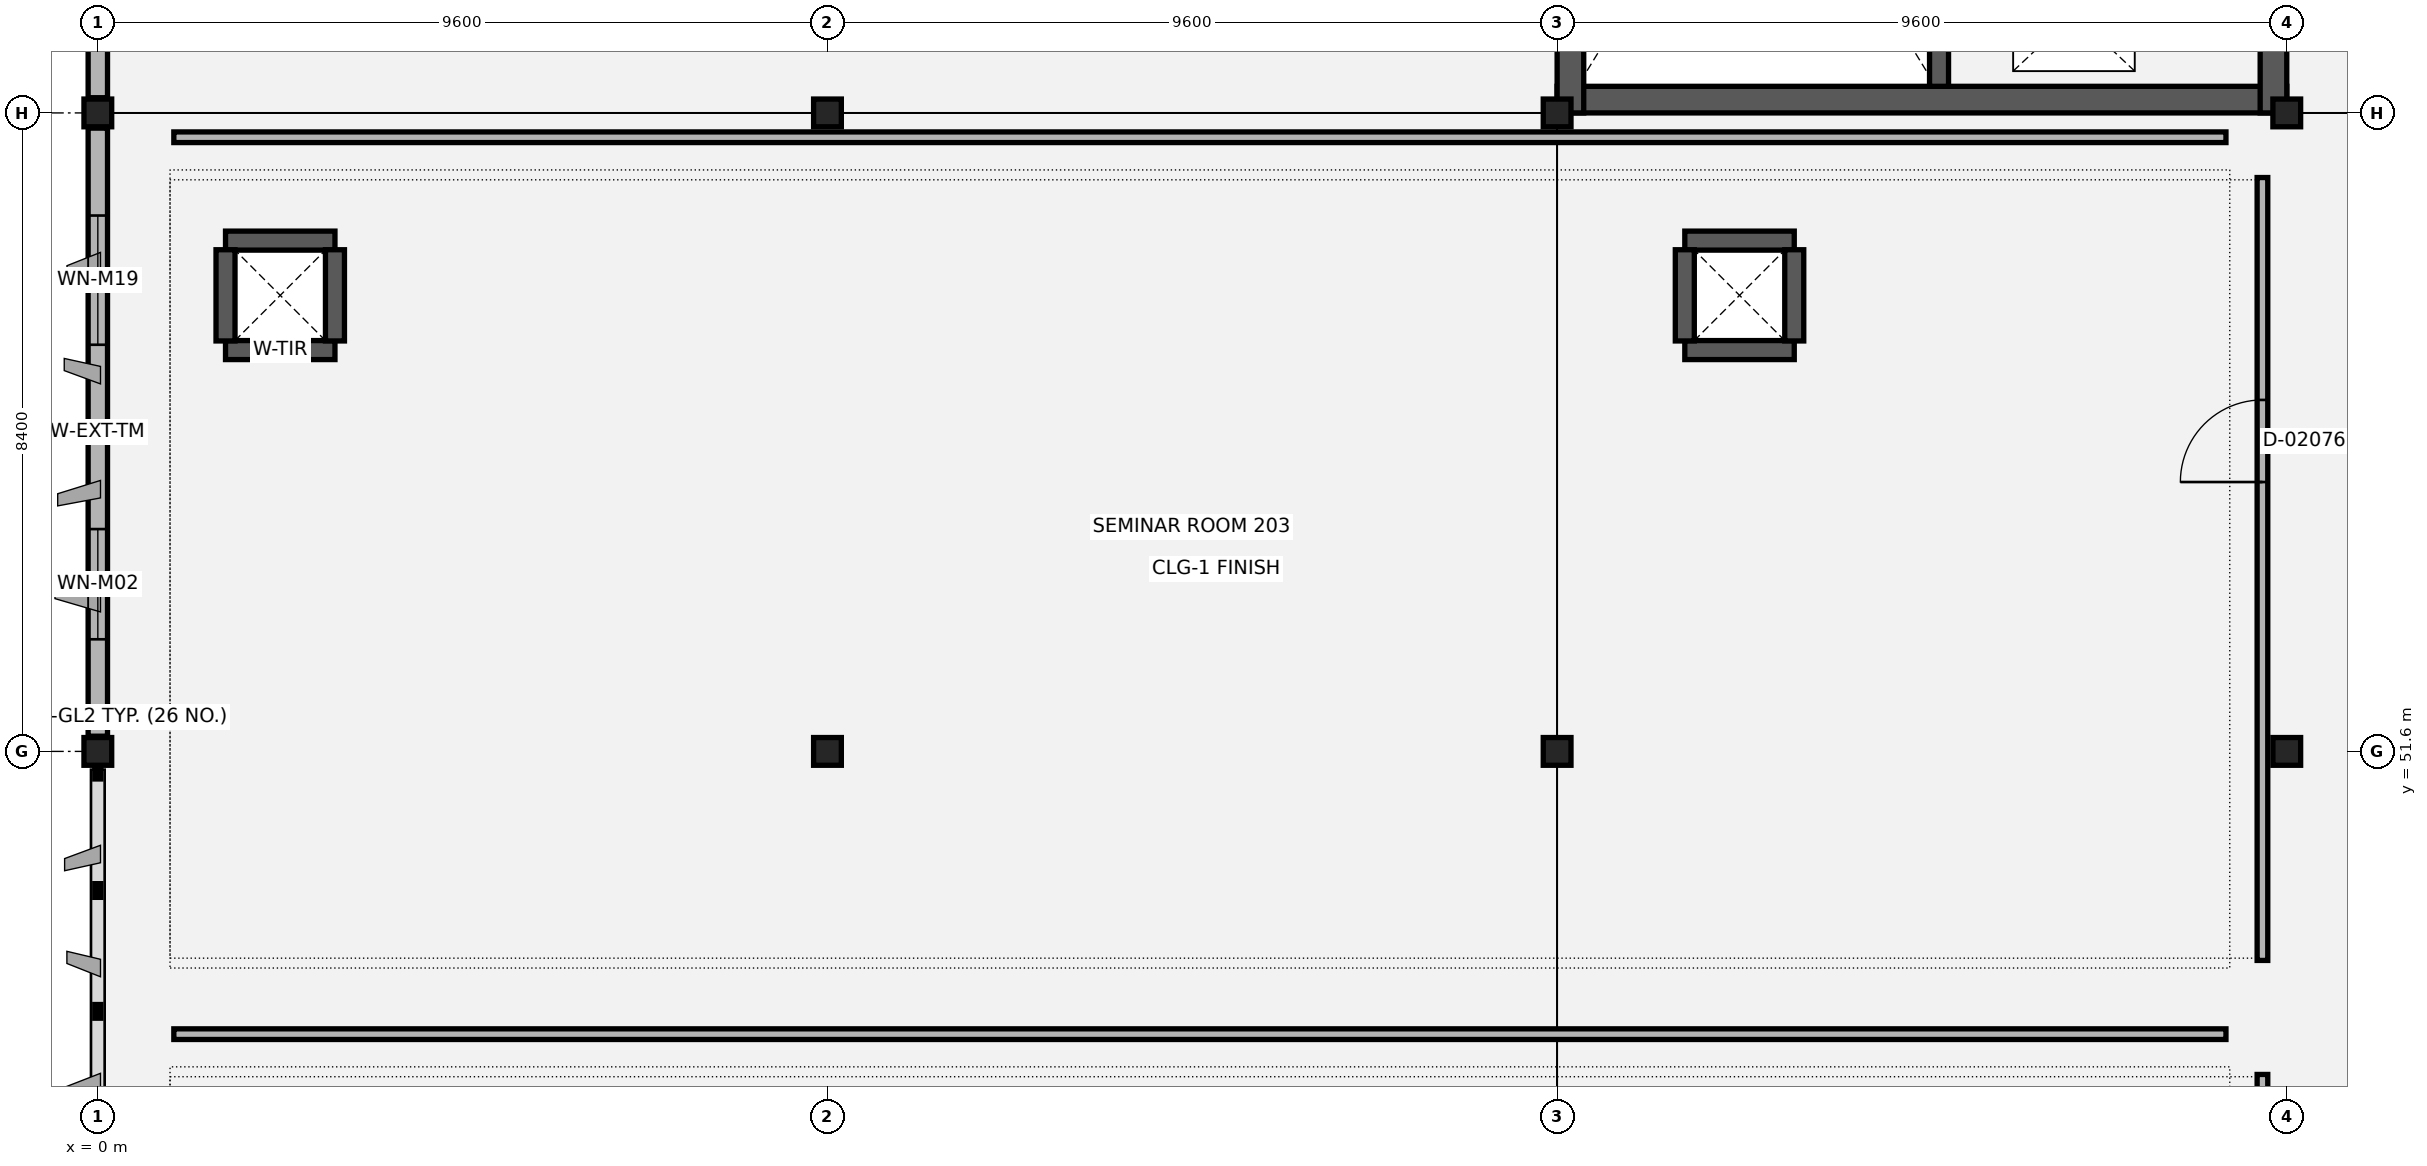
"""IFC4 building model, lengths in metres.
Left out: names, types, materials, properties, quantities, classifications, styles, units other than length and angle.
Written with IfcOpenShell. Run it as: python <this file> out.ifc"""

import sys

from ifc_helpers import new_model, si_unit, direction, frame, frame_2d, origin, origin_2d, place, context, subcontext, project, spatial, rectangle, extrude, element, fill, save


model = new_model("IFC4")
c1 = context("Model", 3, precision=1e-05, world=origin(), true_north=direction((0.0, 1.0)))
c2 = subcontext(c1, "Body", "Model", "MODEL_VIEW")
j1 = project(units=[si_unit("LENGTHUNIT", "METRE"), si_unit("PLANEANGLEUNIT", "RADIAN")], contexts=[c1])
p1 = place(None, origin())
s1 = spatial("IfcSite", under=j1, at=p1, CompositionType="ELEMENT")
p2 = place(p1, origin())
s2 = spatial("IfcBuilding", under=s1, at=p2, CompositionType="ELEMENT")
p3 = place(p2, frame((0.0, 0.0, 10.2)))
s3 = spatial("IfcBuildingStorey", under=s2, at=p3, CompositionType="ELEMENT", Elevation=10.2)
for number, where, z_axis, x_axis in (
    (1, (0.0, 51.6, 0.0), (0.0, 0.0, 1.0), (1.0, 0.0, 0.0)),
    (2, (0.0, 60.0, 0.0), (0.0, 0.0, 1.0), (1.0, 0.0, 0.0)),
    (3, (9.6, 51.6, 0.0), (0.0, 0.0, 1.0), (1.0, 0.0, 0.0)),
    (4, (9.6, 60.0, 0.0), (0.0, 0.0, 1.0), (1.0, 0.0, 0.0)),
    (5, (19.2, 51.6, 0.0), (0.0, 0.0, 1.0), (1.0, 0.0, 0.0)),
    (6, (19.2, 60.0, 0.0), (0.0, 0.0, 1.0), (1.0, 0.0, 0.0)),
    (7, (28.8, 51.6, 0.0), (0.0, 0.0, 1.0), (1.0, 0.0, 0.0)),
    (8, (28.8, 60.0, 0.0), (0.0, 0.0, 1.0), (1.0, 0.0, 0.0)),
):
    element("IfcColumn", number, at=place(p3, frame(where, z_axis=z_axis, x_axis=x_axis)), inside=s3, PredefinedType="COLUMN", context=c2, shape_type="SweptSolid", body=[
        extrude(rectangle(XDim=0.365, YDim=0.365, at=origin_2d()), origin(), (0.0, 0.0, 1.0), 4.2),
    ])
for number, where, z_axis, x_axis in (
    (9, (1.68, 56.88, 0.0), (0.0, 0.0, 1.0), (1.0, 0.0, 0.0)),
    (10, (1.68, 58.32, 0.0), (0.0, 0.0, 1.0), (1.0, 0.0, 0.0)),
):
    element("IfcWall", number, at=place(p3, frame(where, z_axis=z_axis, x_axis=x_axis)), inside=s3, PredefinedType="SHEAR", context=c2, shape_type="SweptSolid", body=[
        extrude(rectangle(XDim=1.44, YDim=0.25, at=frame_2d((0.72, 0.0))), origin(), (0.0, 0.0, 1.0), 3.1),
    ])
for number, where, z_axis, x_axis in (
    (11, (1.68, 57.0, 0.0), (0.0, 0.0, 1.0), (0.0, 1.0, 0.0)),
    (12, (3.12, 57.0, 0.0), (0.0, 0.0, 1.0), (0.0, 1.0, 0.0)),
):
    element("IfcWall", number, at=place(p3, frame(where, z_axis=z_axis, x_axis=x_axis)), inside=s3, PredefinedType="SHEAR", context=c2, shape_type="SweptSolid", body=[
        extrude(rectangle(XDim=1.2, YDim=0.25, at=frame_2d((0.6, 0.0))), origin(), (0.0, 0.0, 1.0), 3.1),
    ])
for number, where, z_axis, x_axis in (
    (13, (20.88, 56.88, 0.0), (0.0, 0.0, 1.0), (1.0, 0.0, 0.0)),
    (14, (20.88, 58.32, 0.0), (0.0, 0.0, 1.0), (1.0, 0.0, 0.0)),
):
    element("IfcWall", number, at=place(p3, frame(where, z_axis=z_axis, x_axis=x_axis)), inside=s3, PredefinedType="SHEAR", context=c2, shape_type="SweptSolid", body=[
        extrude(rectangle(XDim=1.44, YDim=0.25, at=frame_2d((0.72, 0.0))), origin(), (0.0, 0.0, 1.0), 3.1),
    ])
for number, where, z_axis, x_axis in (
    (15, (20.88, 57.0, 0.0), (0.0, 0.0, 1.0), (0.0, 1.0, 0.0)),
    (16, (22.32, 57.0, 0.0), (0.0, 0.0, 1.0), (0.0, 1.0, 0.0)),
):
    element("IfcWall", number, at=place(p3, frame(where, z_axis=z_axis, x_axis=x_axis)), inside=s3, PredefinedType="SHEAR", context=c2, shape_type="SweptSolid", body=[
        extrude(rectangle(XDim=1.2, YDim=0.25, at=frame_2d((0.6, 0.0))), origin(), (0.0, 0.0, 1.0), 3.1),
    ])
p4 = place(p3, frame((0.0, 59.8, 0.0), z_axis=(0.0, 0.0, 1.0), x_axis=(0.0, -1.0, 0.0)))
e17 = element("IfcWall", 17, at=p4, inside=s3, PredefinedType="SOLIDWALL", context=c2, shape_type="SweptSolid", body=[
    extrude(rectangle(XDim=8.0, YDim=0.255, at=frame_2d((4.0, 0.0))), origin(), (0.0, 0.0, 1.0), 3.05),
])
p5 = place(p4, frame((1.15, 0.0, 0.9)))
e18 = element("IfcOpeningElement", 18, at=p5, cuts=e17, PredefinedType="OPENING", context=c2, shape_type="SweptSolid", body=[
    extrude(rectangle(XDim=1.7, YDim=1.45, at=frame_2d((0.85, 0.725))), frame((0.0, 0.137, 0.0), z_axis=(0.0, -1.0, 0.0), x_axis=(1.0, 0.0, 0.0)), (0.0, 0.0, 1.0), 0.275),
])
p6 = place(p4, frame((5.275, 0.0, 0.9)))
e19 = element("IfcOpeningElement", 19, at=p6, cuts=e17, PredefinedType="OPENING", context=c2, shape_type="SweptSolid", body=[
    extrude(rectangle(XDim=1.45, YDim=1.45, at=frame_2d((0.725, 0.725))), frame((0.0, 0.137, 0.0), z_axis=(0.0, -1.0, 0.0), x_axis=(1.0, 0.0, 0.0)), (0.0, 0.0, 1.0), 0.275),
])
p7 = place(p3, frame((0.0, 68.2, 0.0), z_axis=(0.0, 0.0, 1.0), x_axis=(0.0, -1.0, 0.0)))
e20 = element("IfcWall", 20, at=p7, inside=s3, PredefinedType="SOLIDWALL", context=c2, shape_type="SweptSolid", body=[
    extrude(rectangle(XDim=8.0, YDim=0.255, at=frame_2d((4.0, 0.0))), origin(), (0.0, 0.0, 1.0), 3.05),
])
p8 = place(p7, frame((0.75, 0.0, 0.9)))
e21 = element("IfcOpeningElement", 21, at=p8, cuts=e20, PredefinedType="OPENING", context=c2, shape_type="SweptSolid", body=[
    extrude(rectangle(XDim=2.5, YDim=1.65, at=frame_2d((1.25, 0.825))), frame((0.0, 0.137, 0.0), z_axis=(0.0, -1.0, 0.0), x_axis=(1.0, 0.0, 0.0)), (0.0, 0.0, 1.0), 0.275),
])
p9 = place(p7, frame((5.125, 0.0, 0.9)))
e22 = element("IfcOpeningElement", 22, at=p9, cuts=e20, PredefinedType="OPENING", context=c2, shape_type="SweptSolid", body=[
    extrude(rectangle(XDim=1.75, YDim=1.55, at=frame_2d((0.875, 0.775))), frame((0.0, 0.137, 0.0), z_axis=(0.0, -1.0, 0.0), x_axis=(1.0, 0.0, 0.0)), (0.0, 0.0, 1.0), 0.275),
])
p10 = place(p3, frame((19.2, 60.175, 0.0), z_axis=(0.0, 0.0, 1.0), x_axis=(1.0, 0.0, 0.0)))
e23 = element("IfcWall", 23, at=p10, inside=s3, PredefinedType="SHEAR", context=c2, shape_type="SweptSolid", body=[
    extrude(rectangle(XDim=9.6, YDim=0.35, at=frame_2d((4.8, 0.0))), origin(), (0.0, 0.0, 1.0), 3.95),
])
p11 = place(p3, frame((19.375, 60.0, 0.0), z_axis=(0.0, 0.0, 1.0), x_axis=(0.0, 1.0, 0.0)))
e24 = element("IfcWall", 24, at=p11, inside=s3, PredefinedType="SHEAR", context=c2, shape_type="SweptSolid", body=[
    extrude(rectangle(XDim=8.4, YDim=0.35, at=frame_2d((4.2, 0.0))), origin(), (0.0, 0.0, 1.0), 3.95),
])
p12 = place(p3, frame((28.625, 60.0, 0.0), z_axis=(0.0, 0.0, 1.0), x_axis=(0.0, 1.0, 0.0)))
e25 = element("IfcWall", 25, at=p12, inside=s3, PredefinedType="SHEAR", context=c2, shape_type="SweptSolid", body=[
    extrude(rectangle(XDim=8.4, YDim=0.35, at=frame_2d((4.2, 0.0))), origin(), (0.0, 0.0, 1.0), 3.95),
])
p13 = place(p12, frame((5.3, 0.0, 0.0)))
e26 = element("IfcOpeningElement", 26, at=p13, cuts=e25, PredefinedType="OPENING", context=c2, shape_type="SweptSolid", body=[
    extrude(rectangle(XDim=1.4, YDim=2.15, at=frame_2d((0.7, 1.075))), frame((0.0, 0.185, 0.0), z_axis=(0.0, -1.0, 0.0), x_axis=(1.0, 0.0, 0.0)), (0.0, 0.0, 1.0), 0.37),
])
p14 = place(p3, frame((24.225, 68.05, 0.0), z_axis=(0.0, 0.0, 1.0), x_axis=(0.0, -1.0, 0.0)))
e27 = element("IfcWall", 27, at=p14, inside=s3, PredefinedType="SHEAR", context=c2, shape_type="SweptSolid", body=[
    extrude(rectangle(XDim=7.7, YDim=0.25, at=frame_2d((3.85, 0.0))), origin(), (0.0, 0.0, 1.0), 3.95),
])
p15 = place(p14, frame((0.45, 0.0, 0.0)))
e28 = element("IfcOpeningElement", 28, at=p15, cuts=e27, PredefinedType="OPENING", context=c2, shape_type="SweptSolid", body=[
    extrude(rectangle(XDim=1.25, YDim=2.15, at=frame_2d((0.625, 1.075))), frame((0.0, 0.135, 0.0), z_axis=(0.0, -1.0, 0.0), x_axis=(1.0, 0.0, 0.0)), (0.0, 0.0, 1.0), 0.27),
])
p16 = place(p3, frame((28.48, 33.25, 0.0), z_axis=(0.0, 0.0, 1.0), x_axis=(0.0, 1.0, 0.0)))
e29 = element("IfcWall", 29, at=p16, inside=s3, PredefinedType="PARTITIONING", context=c2, shape_type="SweptSolid", body=[
    extrude(rectangle(XDim=14.1, YDim=0.14, at=frame_2d((7.05, 0.0))), origin(), (0.0, 0.0, 1.0), 3.03),
])
p17 = place(p16, frame((2.239, 0.0, 0.0)))
e30 = element("IfcOpeningElement", 30, at=p17, cuts=e29, PredefinedType="OPENING", context=c2, shape_type="SweptSolid", body=[
    extrude(rectangle(XDim=1.04, YDim=2.15, at=frame_2d((0.52, 1.075))), frame((0.0, 0.08, 0.0), z_axis=(0.0, -1.0, 0.0), x_axis=(1.0, 0.0, 0.0)), (0.0, 0.0, 1.0), 0.16),
])
p18 = place(p3, frame((1.0, 47.88, 0.0), z_axis=(0.0, 0.0, 1.0), x_axis=(1.0, 0.0, 0.0)))
e31 = element("IfcWall", 31, at=p18, inside=s3, PredefinedType="PARTITIONING", context=c2, shape_type="SweptSolid", body=[
    extrude(rectangle(XDim=27.0, YDim=0.14, at=frame_2d((13.5, 0.0))), origin(), (0.0, 0.0, 1.0), 3.03),
])
p19 = place(p3, frame((28.48, 48.85, 0.0), z_axis=(0.0, 0.0, 1.0), x_axis=(0.0, 1.0, 0.0)))
e32 = element("IfcWall", 32, at=p19, inside=s3, PredefinedType="PARTITIONING", context=c2, shape_type="SweptSolid", body=[
    extrude(rectangle(XDim=10.3, YDim=0.14, at=frame_2d((5.15, 0.0))), origin(), (0.0, 0.0, 1.0), 3.03),
])
p20 = place(p19, frame((6.294, 0.0, 0.0)))
e33 = element("IfcOpeningElement", 33, at=p20, cuts=e32, PredefinedType="OPENING", context=c2, shape_type="SweptSolid", body=[
    extrude(rectangle(XDim=1.08, YDim=2.15, at=frame_2d((0.54, 1.075))), frame((0.0, 0.08, 0.0), z_axis=(0.0, -1.0, 0.0), x_axis=(1.0, 0.0, 0.0)), (0.0, 0.0, 1.0), 0.16),
])
p21 = place(p3, frame((1.0, 59.68, 0.0), z_axis=(0.0, 0.0, 1.0), x_axis=(1.0, 0.0, 0.0)))
e34 = element("IfcWall", 34, at=p21, inside=s3, PredefinedType="PARTITIONING", context=c2, shape_type="SweptSolid", body=[
    extrude(rectangle(XDim=27.0, YDim=0.14, at=frame_2d((13.5, 0.0))), origin(), (0.0, 0.0, 1.0), 3.03),
])
p22 = place(p5, origin())
e35 = element("IfcWindow", 35, at=p22, inside=s3, PartitioningType="SINGLE_PANEL", PredefinedType="WINDOW", context=c2, shape_type="SweptSolid", body=[
    extrude(rectangle(XDim=1.7, YDim=1.45, at=frame_2d((0.85, 0.725))), frame((0.0, 0.03, 0.0), z_axis=(0.0, -1.0, 0.0), x_axis=(1.0, 0.0, 0.0)), (0.0, 0.0, 1.0), 0.06),
])
fill(e18, e35)
p23 = place(p6, origin())
e36 = element("IfcWindow", 36, at=p23, inside=s3, PartitioningType="SINGLE_PANEL", PredefinedType="WINDOW", context=c2, shape_type="SweptSolid", body=[
    extrude(rectangle(XDim=1.45, YDim=1.45, at=frame_2d((0.725, 0.725))), frame((0.0, 0.03, 0.0), z_axis=(0.0, -1.0, 0.0), x_axis=(1.0, 0.0, 0.0)), (0.0, 0.0, 1.0), 0.06),
])
fill(e19, e36)
p24 = place(p20, origin())
e37 = element("IfcDoor", 37, at=p24, inside=s3, OperationType="SINGLE_SWING_LEFT", PredefinedType="DOOR", context=c2, shape_type="SweptSolid", body=[
    extrude(rectangle(XDim=1.08, YDim=2.15, at=frame_2d((0.54, 1.075))), frame((0.0, 0.025, 0.0), z_axis=(0.0, -1.0, 0.0), x_axis=(1.0, 0.0, 0.0)), (0.0, 0.0, 1.0), 0.05),
])
fill(e33, e37)
save(model, sys.argv[1])
